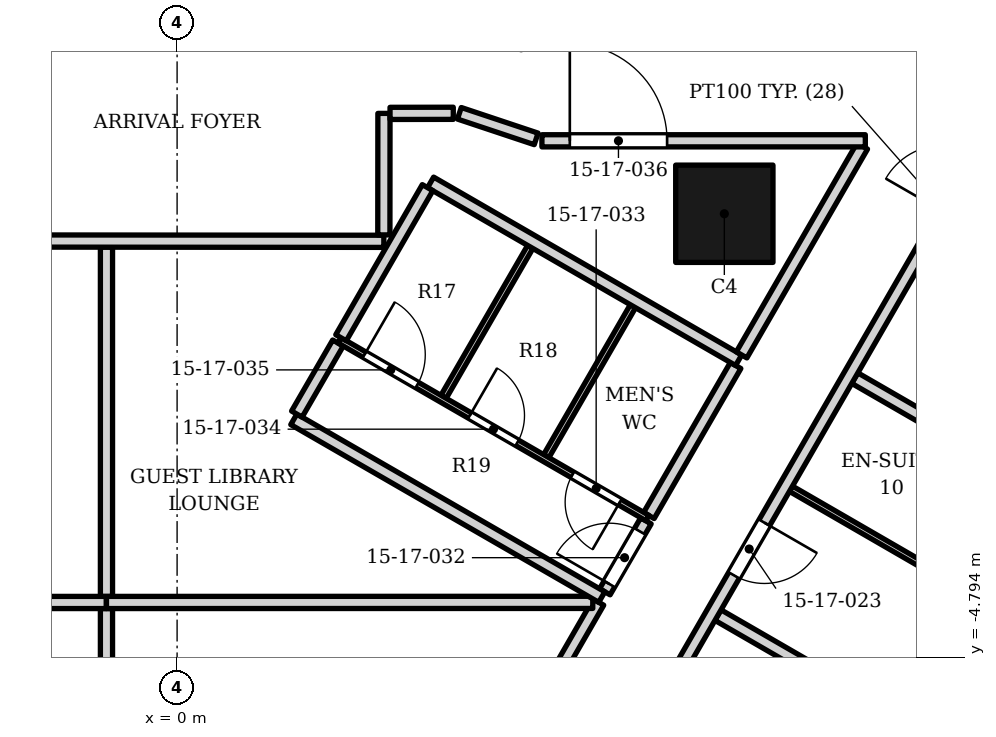
"""IFC4 building model, lengths in metres.
Left out: names, types, materials, properties, quantities, classifications, styles, units other than length and angle.
Written with IfcOpenShell. Run it as: python <this file> out.ifc"""

import sys

from ifc_helpers import new_model, si_unit, direction, frame, frame_2d, origin, origin_2d, place, context, subcontext, project, spatial, rectangle, extrude, element, fill, save


model = new_model("IFC4")
c1 = context("Model", 3, precision=1e-05, world=origin(), true_north=direction((0.0, 1.0)))
c2 = subcontext(c1, "Body", "Model", "MODEL_VIEW")
j1 = project(units=[si_unit("LENGTHUNIT", "METRE"), si_unit("PLANEANGLEUNIT", "RADIAN")], contexts=[c1])
p1 = place(None, origin())
s1 = spatial("IfcSite", under=j1, at=p1, CompositionType="ELEMENT")
p2 = place(p1, origin())
s2 = spatial("IfcBuilding", under=s1, at=p2, CompositionType="ELEMENT")
p3 = place(p2, frame((0.0, 0.0, 76.6)))
s3 = spatial("IfcBuildingStorey", under=s2, at=p3, CompositionType="ELEMENT", Elevation=76.6)
p4 = place(p3, frame((9.0, 2.5, 0.0), z_axis=(0.0, 0.0, 1.0), x_axis=(1.0, 0.0, 0.0)))
e1 = element("IfcColumn", 1, at=p4, inside=s3, PredefinedType="COLUMN", context=c2, shape_type="SweptSolid", body=[
    extrude(rectangle(XDim=1.6, YDim=1.6, at=origin_2d()), origin(), (0.0, 0.0, 1.0), 3.4),
])
p5 = place(p3, frame((-11.206, 0.0, 0.0), z_axis=(0.0, 0.0, 1.0), x_axis=(0.500002959525, -0.866023695095, 0.0)))
e2 = element("IfcWall", 2, at=p5, inside=s3, PredefinedType="PARTITIONING", context=c2, shape_type="SweptSolid", body=[
    extrude(rectangle(XDim=22.351, YDim=0.2, at=frame_2d((11.175, 0.0))), origin(), (0.0, 0.0, 1.0), 2.242),
])
p6 = place(p5, frame((0.7, 0.0, 0.0)))
e3 = element("IfcOpeningElement", 3, at=p6, cuts=e2, PredefinedType="OPENING", context=c2, shape_type="SweptSolid", body=[
    extrude(rectangle(XDim=1.0, YDim=2.1, at=frame_2d((0.5, 1.05))), frame((0.0, 0.11, 0.0), z_axis=(0.0, -1.0, 0.0), x_axis=(1.0, 0.0, 0.0)), (0.0, 0.0, 1.0), 0.22),
])
p7 = place(p5, frame((3.1, 0.0, 0.0)))
e4 = element("IfcOpeningElement", 4, at=p7, cuts=e2, PredefinedType="OPENING", context=c2, shape_type="SweptSolid", body=[
    extrude(rectangle(XDim=1.0, YDim=2.1, at=frame_2d((0.5, 1.05))), frame((0.0, 0.11, 0.0), z_axis=(0.0, -1.0, 0.0), x_axis=(1.0, 0.0, 0.0)), (0.0, 0.0, 1.0), 0.22),
])
p8 = place(p5, frame((9.7, 0.0, 0.0)))
e5 = element("IfcOpeningElement", 5, at=p8, cuts=e2, PredefinedType="OPENING", context=c2, shape_type="SweptSolid", body=[
    extrude(rectangle(XDim=1.0, YDim=2.1, at=frame_2d((0.5, 1.05))), frame((0.0, 0.11, 0.0), z_axis=(0.0, -1.0, 0.0), x_axis=(1.0, 0.0, 0.0)), (0.0, 0.0, 1.0), 0.22),
])
p9 = place(p5, frame((12.1, 0.0, 0.0)))
e6 = element("IfcOpeningElement", 6, at=p9, cuts=e2, PredefinedType="OPENING", context=c2, shape_type="SweptSolid", body=[
    extrude(rectangle(XDim=1.0, YDim=2.1, at=frame_2d((0.5, 1.05))), frame((0.0, 0.11, 0.0), z_axis=(0.0, -1.0, 0.0), x_axis=(1.0, 0.0, 0.0)), (0.0, 0.0, 1.0), 0.22),
])
p10 = place(p5, frame((16.4, 0.0, 0.0)))
e7 = element("IfcOpeningElement", 7, at=p10, cuts=e2, PredefinedType="OPENING", context=c2, shape_type="SweptSolid", body=[
    extrude(rectangle(XDim=1.1, YDim=2.1, at=frame_2d((0.55, 1.05))), frame((0.0, 0.11, 0.0), z_axis=(0.0, -1.0, 0.0), x_axis=(1.0, 0.0, 0.0)), (0.0, 0.0, 1.0), 0.22),
])
p11 = place(p5, frame((20.925, 0.0, 0.0)))
e8 = element("IfcOpeningElement", 8, at=p11, cuts=e2, PredefinedType="OPENING", context=c2, shape_type="SweptSolid", body=[
    extrude(rectangle(XDim=1.1, YDim=2.1, at=frame_2d((0.55, 1.05))), frame((0.0, 0.11, 0.0), z_axis=(0.0, -1.0, 0.0), x_axis=(1.0, 0.0, 0.0)), (0.0, 0.0, 1.0), 0.22),
])
p12 = place(p3, frame((-0.029, -15.955, 0.0), z_axis=(0.0, 0.0, 1.0), x_axis=(0.499541892375, 0.866289730842, 0.0)))
e9 = element("IfcWall", 9, at=p12, inside=s3, PredefinedType="PARTITIONING", context=c2, shape_type="SweptSolid", body=[
    extrude(rectangle(XDim=13.93, YDim=0.2, at=frame_2d((6.965, 0.0))), origin(), (0.0, 0.0, 1.0), 2.242),
])
p13 = place(p12, frame((1.27, 0.0, 0.0)))
e10 = element("IfcOpeningElement", 10, at=p13, cuts=e9, PredefinedType="OPENING", context=c2, shape_type="SweptSolid", body=[
    extrude(rectangle(XDim=0.9, YDim=2.1, at=frame_2d((0.45, 1.05))), frame((0.0, 0.11, 0.0), z_axis=(0.0, -1.0, 0.0), x_axis=(1.0, 0.0, 0.0)), (0.0, 0.0, 1.0), 0.22),
])
p14 = place(p12, frame((8.235, 0.0, 0.0)))
e11 = element("IfcOpeningElement", 11, at=p14, cuts=e9, PredefinedType="OPENING", context=c2, shape_type="SweptSolid", body=[
    extrude(rectangle(XDim=0.9, YDim=2.1, at=frame_2d((0.45, 1.05))), frame((0.0, 0.11, 0.0), z_axis=(0.0, -1.0, 0.0), x_axis=(1.0, 0.0, 0.0)), (0.0, 0.0, 1.0), 0.22),
])
p15 = place(p3, frame((8.895, -4.1, 0.0), z_axis=(0.0, 0.0, 1.0), x_axis=(0.865906406618, -0.500206052519, 0.0)))
e12 = element("IfcWall", 12, at=p15, inside=s3, PredefinedType="PARTITIONING", context=c2, shape_type="SweptSolid", body=[
    extrude(rectangle(XDim=7.05, YDim=0.2, at=frame_2d((3.525, 0.0))), origin(), (0.0, 0.0, 1.0), 2.242),
])
p16 = place(p3, frame((-1.162, -11.327, 0.0), z_axis=(0.0, 0.0, 1.0), x_axis=(0.0, 1.0, 0.0)))
e13 = element("IfcWall", 13, at=p16, inside=s3, PredefinedType="PARTITIONING", context=c2, shape_type="SweptSolid", body=[
    extrude(rectangle(XDim=7.335, YDim=0.2, at=frame_2d((3.667, 0.0))), origin(), (0.0, 0.0, 1.0), 3.23),
])
p17 = place(p3, frame((-6.991, -3.893, 0.0), z_axis=(0.0, 0.0, 1.0), x_axis=(0.499865112403, -0.86610326717, 0.0)))
e14 = element("IfcWall", 14, at=p17, inside=s3, PredefinedType="PARTITIONING", context=c2, shape_type="SweptSolid", body=[
    extrude(rectangle(XDim=13.827, YDim=0.2, at=frame_2d((6.914, 0.0))), origin(), (0.0, 0.0, 1.0), 2.242),
])
p18 = place(p17, frame((5.377, 0.0, 0.0)))
e15 = element("IfcOpeningElement", 15, at=p18, cuts=e14, PredefinedType="OPENING", context=c2, shape_type="SweptSolid", body=[
    extrude(rectangle(XDim=0.9, YDim=2.1, at=frame_2d((0.45, 1.05))), frame((0.0, 0.11, 0.0), z_axis=(0.0, -1.0, 0.0), x_axis=(1.0, 0.0, 0.0)), (0.0, 0.0, 1.0), 0.22),
])
p19 = place(p3, frame((-6.891, -3.893, 0.0), z_axis=(0.0, 0.0, 1.0), x_axis=(1.0, 0.0, 0.0)))
e16 = element("IfcWall", 16, at=p19, inside=s3, PredefinedType="PARTITIONING", context=c2, shape_type="SweptSolid", body=[
    extrude(rectangle(XDim=5.727, YDim=0.2, at=frame_2d((2.864, 0.0))), origin(), (0.0, 0.0, 1.0), 2.242),
])
p20 = place(p3, frame((-1.162, -3.893, 0.0), z_axis=(0.0, 0.0, 1.0), x_axis=(0.999999970181, 0.000244207691, 0.0)))
e17 = element("IfcWall", 17, at=p20, inside=s3, PredefinedType="PARTITIONING", context=c2, shape_type="SweptSolid", body=[
    extrude(rectangle(XDim=7.998, YDim=0.2, at=frame_2d((3.999, 0.0))), origin(), (0.0, 0.0, 1.0), 3.23),
])
p21 = place(p3, frame((-1.162, -3.791, 0.0), z_axis=(0.0, 0.0, 1.0), x_axis=(0.0, 1.0, 0.0)))
e18 = element("IfcWall", 18, at=p21, inside=s3, PredefinedType="PARTITIONING", context=c2, shape_type="SweptSolid", body=[
    extrude(rectangle(XDim=5.743, YDim=0.2, at=frame_2d((2.872, 0.0))), origin(), (0.0, 0.0, 1.0), 3.23),
])
p22 = place(p3, frame((7.035, -3.717, 0.0), z_axis=(0.0, 0.0, 1.0), x_axis=(0.50106482324, 0.865409754342, 0.0)))
e19 = element("IfcWall", 19, at=p22, inside=s3, PredefinedType="PARTITIONING", context=c2, shape_type="SweptSolid", body=[
    extrude(rectangle(XDim=1.348, YDim=0.2, at=frame_2d((0.674, 0.0))), origin(), (0.0, 0.0, 1.0), 2.242),
])
p23 = place(p22, frame((0.148, 0.0, 0.0)))
e20 = element("IfcOpeningElement", 20, at=p23, cuts=e19, PredefinedType="OPENING", context=c2, shape_type="SweptSolid", body=[
    extrude(rectangle(XDim=1.0, YDim=2.1, at=frame_2d((0.5, 1.05))), frame((0.0, 0.11, 0.0), z_axis=(0.0, -1.0, 0.0), x_axis=(1.0, 0.0, 0.0)), (0.0, 0.0, 1.0), 0.22),
])
p24 = place(p3, frame((7.759, -2.462, 0.0), z_axis=(0.0, 0.0, 1.0), x_axis=(0.500533044877, 0.865717431375, 0.0)))
e21 = element("IfcWall", 21, at=p24, inside=s3, PredefinedType="PARTITIONING", context=c2, shape_type="SweptSolid", body=[
    extrude(rectangle(XDim=2.85, YDim=0.2, at=frame_2d((1.425, 0.0))), origin(), (0.0, 0.0, 1.0), 2.473),
])
p25 = place(p3, frame((10.094, -2.021, 0.0), z_axis=(0.0, 0.0, 1.0), x_axis=(0.86571095196, -0.500544251447, 0.0)))
e22 = element("IfcWall", 22, at=p25, inside=s3, PredefinedType="PARTITIONING", context=c2, shape_type="SweptSolid", body=[
    extrude(rectangle(XDim=2.7, YDim=0.1, at=frame_2d((1.35, 0.0))), origin(), (0.0, 0.0, 1.0), 2.242),
])
p26 = place(p3, frame((6.071, -1.486, 0.0), z_axis=(0.0, 0.0, 1.0), x_axis=(0.500536077286, 0.865715678115, 0.0)))
e23 = element("IfcWall", 23, at=p26, inside=s3, PredefinedType="PARTITIONING", context=c2, shape_type="SweptSolid", body=[
    extrude(rectangle(XDim=2.848, YDim=0.1, at=frame_2d((1.424, 0.0))), origin(), (0.0, 0.0, 1.0), 2.242),
])
p27 = place(p3, frame((1.919, -0.881, 0.0), z_axis=(0.0, 0.0, 1.0), x_axis=(0.866167515178, -0.499753775024, 0.0)))
e24 = element("IfcWall", 24, at=p27, inside=s3, PredefinedType="PARTITIONING", context=c2, shape_type="SweptSolid", body=[
    extrude(rectangle(XDim=5.848, YDim=0.2, at=frame_2d((2.924, 0.0))), origin(), (0.0, 0.0, 1.0), 2.242),
])
p28 = place(p3, frame((4.382, -0.511, 0.0), z_axis=(0.0, 0.0, 1.0), x_axis=(0.500536077286, 0.865715678115, 0.0)))
e25 = element("IfcWall", 25, at=p28, inside=s3, PredefinedType="PARTITIONING", context=c2, shape_type="SweptSolid", body=[
    extrude(rectangle(XDim=2.848, YDim=0.1, at=frame_2d((1.424, 0.0))), origin(), (0.0, 0.0, 1.0), 2.242),
])
p29 = place(p3, frame((11.145, -0.202, 0.0), z_axis=(0.0, 0.0, 1.0), x_axis=(0.866031034943, -0.499990246421, 0.0)))
e26 = element("IfcWall", 26, at=p29, inside=s3, PredefinedType="PARTITIONING", context=c2, shape_type="SweptSolid", body=[
    extrude(rectangle(XDim=7.05, YDim=0.2, at=frame_2d((3.525, 0.0))), origin(), (0.0, 0.0, 1.0), 2.242),
])
p30 = place(p3, frame((4.169, 3.016, 0.0), z_axis=(0.0, 0.0, 1.0), x_axis=(0.866018092707, -0.500012662943, 0.0)))
e27 = element("IfcWall", 27, at=p30, inside=s3, PredefinedType="PARTITIONING", context=c2, shape_type="SweptSolid", body=[
    extrude(rectangle(XDim=5.85, YDim=0.2, at=frame_2d((2.925, 0.0))), origin(), (0.0, 0.0, 1.0), 2.242),
])
p31 = place(p3, frame((1.969, -0.794, 0.0), z_axis=(0.0, 0.0, 1.0), x_axis=(0.501000622125, 0.865446923058, 0.0)))
e28 = element("IfcWall", 28, at=p31, inside=s3, PredefinedType="PARTITIONING", context=c2, shape_type="SweptSolid", body=[
    extrude(rectangle(XDim=1.35, YDim=0.2, at=frame_2d((0.675, 0.0))), origin(), (0.0, 0.0, 1.0), 2.242),
])
p32 = place(p3, frame((2.67, 0.42, 0.0), z_axis=(0.0, 0.0, 1.0), x_axis=(0.866025730634, -0.499999433879, 0.0)))
e29 = element("IfcWall", 29, at=p32, inside=s3, PredefinedType="PARTITIONING", context=c2, shape_type="SweptSolid", body=[
    extrude(rectangle(XDim=5.85, YDim=0.1, at=frame_2d((2.925, 0.0))), origin(), (0.0, 0.0, 1.0), 2.242),
])
p33 = place(p32, frame((4.425, 0.0, 0.0)))
e30 = element("IfcOpeningElement", 30, at=p33, cuts=e29, PredefinedType="OPENING", context=c2, shape_type="SweptSolid", body=[
    extrude(rectangle(XDim=0.9, YDim=2.1, at=frame_2d((0.45, 1.05))), frame((0.0, 0.06, 0.0), z_axis=(0.0, -1.0, 0.0), x_axis=(1.0, 0.0, 0.0)), (0.0, 0.0, 1.0), 0.12),
])
p34 = place(p32, frame((2.475, 0.0, 0.0)))
e31 = element("IfcOpeningElement", 31, at=p34, cuts=e29, PredefinedType="OPENING", context=c2, shape_type="SweptSolid", body=[
    extrude(rectangle(XDim=0.9, YDim=2.1, at=frame_2d((0.45, 1.05))), frame((0.0, 0.06, 0.0), z_axis=(0.0, -1.0, 0.0), x_axis=(1.0, 0.0, 0.0)), (0.0, 0.0, 1.0), 0.12),
])
p35 = place(p32, frame((0.475, 0.0, 0.0)))
e32 = element("IfcOpeningElement", 32, at=p35, cuts=e29, PredefinedType="OPENING", context=c2, shape_type="SweptSolid", body=[
    extrude(rectangle(XDim=1.0, YDim=2.1, at=frame_2d((0.5, 1.05))), frame((0.0, 0.06, 0.0), z_axis=(0.0, -1.0, 0.0), x_axis=(1.0, 0.0, 0.0)), (0.0, 0.0, 1.0), 0.12),
])
p36 = place(p3, frame((-3.4, 2.052, 0.0), z_axis=(0.0, 0.0, 1.0), x_axis=(0.999999659082, -0.000825733904, 0.0)))
e33 = element("IfcWall", 33, at=p36, inside=s3, PredefinedType="PARTITIONING", context=c2, shape_type="SweptSolid", body=[
    extrude(rectangle(XDim=6.8, YDim=0.2, at=frame_2d((3.4, 0.0))), origin(), (0.0, 0.0, 1.0), 2.242),
])
p37 = place(p3, frame((0.859, -17.822, 0.0), z_axis=(0.0, 0.0, 1.0), x_axis=(0.500002395808, 0.866024020559, 0.0)))
e34 = element("IfcWall", 34, at=p37, inside=s3, PredefinedType="PARTITIONING", context=c2, shape_type="SweptSolid", body=[
    extrude(rectangle(XDim=23.0, YDim=0.2, at=frame_2d((11.5, 0.0))), origin(), (0.0, 0.0, 1.0), 2.242),
])
p38 = place(p37, frame((0.7, 0.0, 0.0)))
e35 = element("IfcOpeningElement", 35, at=p38, cuts=e34, PredefinedType="OPENING", context=c2, shape_type="SweptSolid", body=[
    extrude(rectangle(XDim=1.0, YDim=2.1, at=frame_2d((0.5, 1.05))), frame((0.0, 0.11, 0.0), z_axis=(0.0, -1.0, 0.0), x_axis=(1.0, 0.0, 0.0)), (0.0, 0.0, 1.0), 0.22),
])
p39 = place(p37, frame((3.1, 0.0, 0.0)))
e36 = element("IfcOpeningElement", 36, at=p39, cuts=e34, PredefinedType="OPENING", context=c2, shape_type="SweptSolid", body=[
    extrude(rectangle(XDim=1.0, YDim=2.1, at=frame_2d((0.5, 1.05))), frame((0.0, 0.11, 0.0), z_axis=(0.0, -1.0, 0.0), x_axis=(1.0, 0.0, 0.0)), (0.0, 0.0, 1.0), 0.22),
])
p40 = place(p37, frame((9.7, 0.0, 0.0)))
e37 = element("IfcOpeningElement", 37, at=p40, cuts=e34, PredefinedType="OPENING", context=c2, shape_type="SweptSolid", body=[
    extrude(rectangle(XDim=1.0, YDim=2.1, at=frame_2d((0.5, 1.05))), frame((0.0, 0.11, 0.0), z_axis=(0.0, -1.0, 0.0), x_axis=(1.0, 0.0, 0.0)), (0.0, 0.0, 1.0), 0.22),
])
p41 = place(p37, frame((12.1, 0.0, 0.0)))
e38 = element("IfcOpeningElement", 38, at=p41, cuts=e34, PredefinedType="OPENING", context=c2, shape_type="SweptSolid", body=[
    extrude(rectangle(XDim=1.0, YDim=2.1, at=frame_2d((0.5, 1.05))), frame((0.0, 0.11, 0.0), z_axis=(0.0, -1.0, 0.0), x_axis=(1.0, 0.0, 0.0)), (0.0, 0.0, 1.0), 0.22),
])
p42 = place(p37, frame((16.6, 0.0, 0.0)))
e39 = element("IfcOpeningElement", 39, at=p42, cuts=e34, PredefinedType="OPENING", context=c2, shape_type="SweptSolid", body=[
    extrude(rectangle(XDim=1.0, YDim=2.1, at=frame_2d((0.5, 1.05))), frame((0.0, 0.11, 0.0), z_axis=(0.0, -1.0, 0.0), x_axis=(1.0, 0.0, 0.0)), (0.0, 0.0, 1.0), 0.22),
])
p43 = place(p3, frame((3.4, 2.152, 0.0), z_axis=(0.0, 0.0, 1.0), x_axis=(0.000977397212, 0.999999522347, 0.0)))
e40 = element("IfcWall", 40, at=p43, inside=s3, PredefinedType="PARTITIONING", context=c2, shape_type="SweptSolid", body=[
    extrude(rectangle(XDim=1.998, YDim=0.2, at=frame_2d((0.999, 0.0))), origin(), (0.0, 0.0, 1.0), 3.23),
])
p44 = place(p3, frame((2.696, 0.461, 0.0), z_axis=(0.0, 0.0, 1.0), x_axis=(0.499502432077, 0.866312484239, 0.0)))
e41 = element("IfcWall", 41, at=p44, inside=s3, PredefinedType="PARTITIONING", context=c2, shape_type="SweptSolid", body=[
    extrude(rectangle(XDim=2.85, YDim=0.2, at=frame_2d((1.425, 0.0))), origin(), (0.0, 0.0, 1.0), 3.23),
])
p45 = place(p3, frame((9.284, 0.179, 0.0), z_axis=(0.0, 0.0, 1.0), x_axis=(0.500368865734, 0.865812334287, 0.0)))
e42 = element("IfcWall", 42, at=p45, inside=s3, PredefinedType="PARTITIONING", context=c2, shape_type="SweptSolid", body=[
    extrude(rectangle(XDim=3.966, YDim=0.2, at=frame_2d((1.983, 0.0))), origin(), (0.0, 0.0, 1.0), 2.242),
])
p46 = place(p3, frame((6.0, 3.7, 0.0), z_axis=(0.0, 0.0, 1.0), x_axis=(1.0, 0.0, 0.0)))
e43 = element("IfcWall", 43, at=p46, inside=s3, PredefinedType="PARTITIONING", context=c2, shape_type="SweptSolid", body=[
    extrude(rectangle(XDim=5.319, YDim=0.2, at=frame_2d((2.659, 0.0))), origin(), (0.0, 0.0, 1.0), 2.242),
])
p47 = place(p46, frame((0.459, 0.0, 0.0)))
e44 = element("IfcOpeningElement", 44, at=p47, cuts=e43, PredefinedType="OPENING", context=c2, shape_type="SweptSolid", body=[
    extrude(rectangle(XDim=1.6, YDim=2.1, at=frame_2d((0.8, 1.05))), frame((0.0, 0.11, 0.0), z_axis=(0.0, -1.0, 0.0), x_axis=(1.0, 0.0, 0.0)), (0.0, 0.0, 1.0), 0.22),
])
p48 = place(p3, frame((3.502, 4.151, 0.0), z_axis=(0.0, 0.0, 1.0), x_axis=(0.9999990086, 0.001408118764, 0.0)))
e45 = element("IfcWall", 45, at=p48, inside=s3, PredefinedType="PARTITIONING", context=c2, shape_type="SweptSolid", body=[
    extrude(rectangle(XDim=1.04, YDim=0.2, at=frame_2d((0.52, 0.0))), origin(), (0.0, 0.0, 1.0), 3.23),
])
p49 = place(p3, frame((4.642, 4.152, 0.0), z_axis=(0.0, 0.0, 1.0), x_axis=(0.948683298051, -0.316227766017, 0.0)))
e46 = element("IfcWall", 46, at=p49, inside=s3, PredefinedType="PARTITIONING", context=c2, shape_type="SweptSolid", body=[
    extrude(rectangle(XDim=1.331, YDim=0.2, at=frame_2d((0.666, 0.0))), origin(), (0.0, 0.0, 1.0), 2.242),
])
p50 = place(p42, origin())
e47 = element("IfcDoor", 47, at=p50, inside=s3, OperationType="SINGLE_SWING_RIGHT", PredefinedType="DOOR", context=c2, shape_type="SweptSolid", body=[
    extrude(rectangle(XDim=1.0, YDim=2.1, at=frame_2d((0.5, 1.05))), frame((0.0, 0.025, 0.0), z_axis=(0.0, -1.0, 0.0), x_axis=(1.0, 0.0, 0.0)), (0.0, 0.0, 1.0), 0.05),
])
fill(e39, e47)
p51 = place(p23, origin())
e48 = element("IfcDoor", 48, at=p51, inside=s3, OperationType="SINGLE_SWING_LEFT", PredefinedType="DOOR", context=c2, shape_type="SweptSolid", body=[
    extrude(rectangle(XDim=1.0, YDim=2.1, at=frame_2d((0.5, 1.05))), frame((0.0, 0.025, 0.0), z_axis=(0.0, -1.0, 0.0), x_axis=(1.0, 0.0, 0.0)), (0.0, 0.0, 1.0), 0.05),
])
fill(e20, e48)
p52 = place(p33, origin())
e49 = element("IfcDoor", 49, at=p52, inside=s3, OperationType="SINGLE_SWING_RIGHT", PredefinedType="DOOR", context=c2, shape_type="SweptSolid", body=[
    extrude(rectangle(XDim=0.9, YDim=2.1, at=frame_2d((0.45, 1.05))), frame((0.0, 0.025, 0.0), z_axis=(0.0, -1.0, 0.0), x_axis=(1.0, 0.0, 0.0)), (0.0, 0.0, 1.0), 0.05),
])
fill(e30, e49)
p53 = place(p34, origin())
e50 = element("IfcDoor", 50, at=p53, inside=s3, OperationType="SINGLE_SWING_LEFT", PredefinedType="DOOR", context=c2, shape_type="SweptSolid", body=[
    extrude(rectangle(XDim=0.9, YDim=2.1, at=frame_2d((0.45, 1.05))), frame((0.0, 0.025, 0.0), z_axis=(0.0, -1.0, 0.0), x_axis=(1.0, 0.0, 0.0)), (0.0, 0.0, 1.0), 0.05),
])
fill(e31, e50)
p54 = place(p35, origin())
e51 = element("IfcDoor", 51, at=p54, inside=s3, OperationType="SINGLE_SWING_LEFT", PredefinedType="DOOR", context=c2, shape_type="SweptSolid", body=[
    extrude(rectangle(XDim=1.0, YDim=2.1, at=frame_2d((0.5, 1.05))), frame((0.0, 0.025, 0.0), z_axis=(0.0, -1.0, 0.0), x_axis=(1.0, 0.0, 0.0)), (0.0, 0.0, 1.0), 0.05),
])
fill(e32, e51)
p55 = place(p47, origin())
e52 = element("IfcDoor", 52, at=p55, inside=s3, OperationType="DOUBLE_DOOR_SINGLE_SWING", PredefinedType="DOOR", context=c2, shape_type="SweptSolid", body=[
    extrude(rectangle(XDim=1.6, YDim=2.1, at=frame_2d((0.8, 1.05))), frame((0.0, 0.025, 0.0), z_axis=(0.0, -1.0, 0.0), x_axis=(1.0, 0.0, 0.0)), (0.0, 0.0, 1.0), 0.05),
])
fill(e44, e52)
save(model, sys.argv[1])
